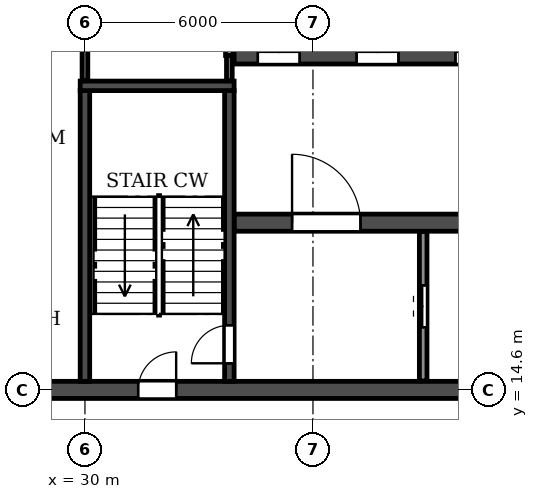
"""IFC4 building model, lengths in metres.
Left out: names, types, materials, properties, quantities, classifications, styles, units other than length and angle.
Written with IfcOpenShell. Run it as: python <this file> out.ifc"""

import sys

from ifc_helpers import new_model, si_unit, direction, frame, frame_2d, origin, place, context, subcontext, project, spatial, rectangle, extrude, element, fill, save


model = new_model("IFC4")
c1 = context("Model", 3, precision=1e-05, world=origin(), true_north=direction((0.0, 1.0)))
c2 = subcontext(c1, "Body", "Model", "MODEL_VIEW")
j1 = project(units=[si_unit("LENGTHUNIT", "METRE"), si_unit("PLANEANGLEUNIT", "RADIAN")], contexts=[c1])
p1 = place(None, origin())
s1 = spatial("IfcSite", under=j1, at=p1, CompositionType="ELEMENT")
p2 = place(p1, origin())
s2 = spatial("IfcBuilding", under=s1, at=p2, CompositionType="ELEMENT")
p3 = place(p2, frame((0.0, 0.0, 152.1)))
s3 = spatial("IfcBuildingStorey", under=s2, at=p3, CompositionType="ELEMENT", Elevation=152.1)
p4 = place(p3, frame((12.2, 14.6, 0.0), z_axis=(0.0, 0.0, 1.0), x_axis=(1.0, 0.0, 0.0)))
e1 = element("IfcWall", 1, at=p4, inside=s3, PredefinedType="SOLIDWALL", context=c2, shape_type="SweptSolid", body=[
    extrude(rectangle(XDim=77.6, YDim=0.45, at=frame_2d((38.8, 0.0))), origin(), (0.0, 0.0, 1.0), 3.07),
])
p5 = place(p4, frame((2.3, 0.0, 0.0)))
e2 = element("IfcOpeningElement", 2, at=p5, cuts=e1, PredefinedType="OPENING", context=c2, shape_type="SweptSolid", body=[
    extrude(rectangle(XDim=1.0, YDim=2.1, at=frame_2d((0.5, 1.05))), frame((0.0, 0.235, 0.0), z_axis=(0.0, -1.0, 0.0), x_axis=(1.0, 0.0, 0.0)), (0.0, 0.0, 1.0), 0.47),
])
p6 = place(p4, frame((6.7, 0.0, 0.0)))
e3 = element("IfcOpeningElement", 3, at=p6, cuts=e1, PredefinedType="OPENING", context=c2, shape_type="SweptSolid", body=[
    extrude(rectangle(XDim=1.0, YDim=2.1, at=frame_2d((0.5, 1.05))), frame((0.0, 0.235, 0.0), z_axis=(0.0, -1.0, 0.0), x_axis=(1.0, 0.0, 0.0)), (0.0, 0.0, 1.0), 0.47),
])
p7 = place(p4, frame((14.6, 0.0, 0.0)))
e4 = element("IfcOpeningElement", 4, at=p7, cuts=e1, PredefinedType="OPENING", context=c2, shape_type="SweptSolid", body=[
    extrude(rectangle(XDim=1.0, YDim=2.1, at=frame_2d((0.5, 1.05))), frame((0.0, 0.235, 0.0), z_axis=(0.0, -1.0, 0.0), x_axis=(1.0, 0.0, 0.0)), (0.0, 0.0, 1.0), 0.47),
])
p8 = place(p4, frame((19.2, 0.0, 0.0)))
e5 = element("IfcOpeningElement", 5, at=p8, cuts=e1, PredefinedType="OPENING", context=c2, shape_type="SweptSolid", body=[
    extrude(rectangle(XDim=1.0, YDim=2.1, at=frame_2d((0.5, 1.05))), frame((0.0, 0.235, 0.0), z_axis=(0.0, -1.0, 0.0), x_axis=(1.0, 0.0, 0.0)), (0.0, 0.0, 1.0), 0.47),
])
p9 = place(p4, frame((30.5, 0.0, 0.0)))
e6 = element("IfcOpeningElement", 6, at=p9, cuts=e1, PredefinedType="OPENING", context=c2, shape_type="SweptSolid", body=[
    extrude(rectangle(XDim=1.0, YDim=2.1, at=frame_2d((0.5, 1.05))), frame((0.0, 0.235, 0.0), z_axis=(0.0, -1.0, 0.0), x_axis=(1.0, 0.0, 0.0)), (0.0, 0.0, 1.0), 0.47),
])
p10 = place(p4, frame((34.15, 0.0, 0.0)))
e7 = element("IfcOpeningElement", 7, at=p10, cuts=e1, PredefinedType="OPENING", context=c2, shape_type="SweptSolid", body=[
    extrude(rectangle(XDim=1.5, YDim=2.1, at=frame_2d((0.75, 1.05))), frame((0.0, 0.235, 0.0), z_axis=(0.0, -1.0, 0.0), x_axis=(1.0, 0.0, 0.0)), (0.0, 0.0, 1.0), 0.47),
])
p11 = place(p4, frame((38.3, 0.0, 0.0)))
e8 = element("IfcOpeningElement", 8, at=p11, cuts=e1, PredefinedType="OPENING", context=c2, shape_type="SweptSolid", body=[
    extrude(rectangle(XDim=1.0, YDim=2.1, at=frame_2d((0.5, 1.05))), frame((0.0, 0.235, 0.0), z_axis=(0.0, -1.0, 0.0), x_axis=(1.0, 0.0, 0.0)), (0.0, 0.0, 1.0), 0.47),
])
p12 = place(p4, frame((43.5, 0.0, 0.0)))
e9 = element("IfcOpeningElement", 9, at=p12, cuts=e1, PredefinedType="OPENING", context=c2, shape_type="SweptSolid", body=[
    extrude(rectangle(XDim=1.0, YDim=2.1, at=frame_2d((0.5, 1.05))), frame((0.0, 0.235, 0.0), z_axis=(0.0, -1.0, 0.0), x_axis=(1.0, 0.0, 0.0)), (0.0, 0.0, 1.0), 0.47),
])
p13 = place(p4, frame((57.4, 0.0, 0.0)))
e10 = element("IfcOpeningElement", 10, at=p13, cuts=e1, PredefinedType="OPENING", context=c2, shape_type="SweptSolid", body=[
    extrude(rectangle(XDim=1.0, YDim=2.1, at=frame_2d((0.5, 1.05))), frame((0.0, 0.235, 0.0), z_axis=(0.0, -1.0, 0.0), x_axis=(1.0, 0.0, 0.0)), (0.0, 0.0, 1.0), 0.47),
])
p14 = place(p4, frame((62.0, 0.0, 0.0)))
e11 = element("IfcOpeningElement", 11, at=p14, cuts=e1, PredefinedType="OPENING", context=c2, shape_type="SweptSolid", body=[
    extrude(rectangle(XDim=1.0, YDim=2.1, at=frame_2d((0.5, 1.05))), frame((0.0, 0.235, 0.0), z_axis=(0.0, -1.0, 0.0), x_axis=(1.0, 0.0, 0.0)), (0.0, 0.0, 1.0), 0.47),
])
p15 = place(p4, frame((69.9, 0.0, 0.0)))
e12 = element("IfcOpeningElement", 12, at=p15, cuts=e1, PredefinedType="OPENING", context=c2, shape_type="SweptSolid", body=[
    extrude(rectangle(XDim=1.0, YDim=2.1, at=frame_2d((0.5, 1.05))), frame((0.0, 0.235, 0.0), z_axis=(0.0, -1.0, 0.0), x_axis=(1.0, 0.0, 0.0)), (0.0, 0.0, 1.0), 0.47),
])
p16 = place(p4, frame((74.3, 0.0, 0.0)))
e13 = element("IfcOpeningElement", 13, at=p16, cuts=e1, PredefinedType="OPENING", context=c2, shape_type="SweptSolid", body=[
    extrude(rectangle(XDim=1.0, YDim=2.1, at=frame_2d((0.5, 1.05))), frame((0.0, 0.235, 0.0), z_axis=(0.0, -1.0, 0.0), x_axis=(1.0, 0.0, 0.0)), (0.0, 0.0, 1.0), 0.47),
])
p17 = place(p3, frame((33.925, 19.0, 0.0), z_axis=(0.0, 0.0, 1.0), x_axis=(1.0, 0.0, 0.0)))
e14 = element("IfcWall", 14, at=p17, inside=s3, PredefinedType="SOLIDWALL", context=c2, shape_type="SweptSolid", body=[
    extrude(rectangle(XDim=34.15, YDim=0.45, at=frame_2d((17.075, 0.0))), origin(), (0.0, 0.0, 1.0), 3.07),
])
p18 = place(p17, frame((16.175, 0.0, 0.0)))
e15 = element("IfcOpeningElement", 15, at=p18, cuts=e14, PredefinedType="OPENING", context=c2, shape_type="SweptSolid", body=[
    extrude(rectangle(XDim=1.8, YDim=2.1, at=frame_2d((0.9, 1.05))), frame((0.0, 0.235, 0.0), z_axis=(0.0, -1.0, 0.0), x_axis=(1.0, 0.0, 0.0)), (0.0, 0.0, 1.0), 0.47),
])
p19 = place(p17, frame((1.525, 0.0, 0.0)))
e16 = element("IfcOpeningElement", 16, at=p19, cuts=e14, PredefinedType="OPENING", context=c2, shape_type="SweptSolid", body=[
    extrude(rectangle(XDim=1.8, YDim=2.1, at=frame_2d((0.9, 1.05))), frame((0.0, 0.235, 0.0), z_axis=(0.0, -1.0, 0.0), x_axis=(1.0, 0.0, 0.0)), (0.0, 0.0, 1.0), 0.47),
])
p20 = place(p17, frame((30.825, 0.0, 0.0)))
e17 = element("IfcOpeningElement", 17, at=p20, cuts=e14, PredefinedType="OPENING", context=c2, shape_type="SweptSolid", body=[
    extrude(rectangle(XDim=1.8, YDim=2.1, at=frame_2d((0.9, 1.05))), frame((0.0, 0.235, 0.0), z_axis=(0.0, -1.0, 0.0), x_axis=(1.0, 0.0, 0.0)), (0.0, 0.0, 1.0), 0.47),
])
p21 = place(p3, frame((33.925, 23.4, 0.0), z_axis=(0.0, 0.0, 1.0), x_axis=(1.0, 0.0, 0.0)))
e18 = element("IfcWall", 18, at=p21, inside=s3, PredefinedType="SOLIDWALL", context=c2, shape_type="SweptSolid", body=[
    extrude(rectangle(XDim=34.15, YDim=0.45, at=frame_2d((17.075, 0.0))), origin(), (0.0, 0.0, 1.0), 3.07),
])
p22 = place(p21, frame((16.175, 0.0, 0.0)))
e19 = element("IfcOpeningElement", 19, at=p22, cuts=e18, PredefinedType="OPENING", context=c2, shape_type="SweptSolid", body=[
    extrude(rectangle(XDim=1.8, YDim=2.1, at=frame_2d((0.9, 1.05))), frame((0.0, 0.235, 0.0), z_axis=(0.0, -1.0, 0.0), x_axis=(1.0, 0.0, 0.0)), (0.0, 0.0, 1.0), 0.47),
])
p23 = place(p21, frame((0.625, 0.0, 0.0)))
e20 = element("IfcOpeningElement", 20, at=p23, cuts=e18, PredefinedType="OPENING", context=c2, shape_type="SweptSolid", body=[
    extrude(rectangle(XDim=1.1, YDim=2.1, at=frame_2d((0.55, 1.05))), frame((0.0, 0.235, 0.0), z_axis=(0.0, -1.0, 0.0), x_axis=(1.0, 0.0, 0.0)), (0.0, 0.0, 1.0), 0.47),
])
p24 = place(p21, frame((3.225, 0.0, 0.0)))
e21 = element("IfcOpeningElement", 21, at=p24, cuts=e18, PredefinedType="OPENING", context=c2, shape_type="SweptSolid", body=[
    extrude(rectangle(XDim=1.1, YDim=2.1, at=frame_2d((0.55, 1.05))), frame((0.0, 0.235, 0.0), z_axis=(0.0, -1.0, 0.0), x_axis=(1.0, 0.0, 0.0)), (0.0, 0.0, 1.0), 0.47),
])
p25 = place(p21, frame((5.825, 0.0, 0.0)))
e22 = element("IfcOpeningElement", 22, at=p25, cuts=e18, PredefinedType="OPENING", context=c2, shape_type="SweptSolid", body=[
    extrude(rectangle(XDim=1.1, YDim=2.1, at=frame_2d((0.55, 1.05))), frame((0.0, 0.235, 0.0), z_axis=(0.0, -1.0, 0.0), x_axis=(1.0, 0.0, 0.0)), (0.0, 0.0, 1.0), 0.47),
])
p26 = place(p21, frame((8.425, 0.0, 0.0)))
e23 = element("IfcOpeningElement", 23, at=p26, cuts=e18, PredefinedType="OPENING", context=c2, shape_type="SweptSolid", body=[
    extrude(rectangle(XDim=1.1, YDim=2.1, at=frame_2d((0.55, 1.05))), frame((0.0, 0.235, 0.0), z_axis=(0.0, -1.0, 0.0), x_axis=(1.0, 0.0, 0.0)), (0.0, 0.0, 1.0), 0.47),
])
p27 = place(p21, frame((11.025, 0.0, 0.0)))
e24 = element("IfcOpeningElement", 24, at=p27, cuts=e18, PredefinedType="OPENING", context=c2, shape_type="SweptSolid", body=[
    extrude(rectangle(XDim=1.1, YDim=2.1, at=frame_2d((0.55, 1.05))), frame((0.0, 0.235, 0.0), z_axis=(0.0, -1.0, 0.0), x_axis=(1.0, 0.0, 0.0)), (0.0, 0.0, 1.0), 0.47),
])
p28 = place(p21, frame((13.625, 0.0, 0.0)))
e25 = element("IfcOpeningElement", 25, at=p28, cuts=e18, PredefinedType="OPENING", context=c2, shape_type="SweptSolid", body=[
    extrude(rectangle(XDim=1.1, YDim=2.1, at=frame_2d((0.55, 1.05))), frame((0.0, 0.235, 0.0), z_axis=(0.0, -1.0, 0.0), x_axis=(1.0, 0.0, 0.0)), (0.0, 0.0, 1.0), 0.47),
])
p29 = place(p21, frame((27.225, 0.0, 0.0)))
e26 = element("IfcOpeningElement", 26, at=p29, cuts=e18, PredefinedType="OPENING", context=c2, shape_type="SweptSolid", body=[
    extrude(rectangle(XDim=1.1, YDim=2.1, at=frame_2d((0.55, 1.05))), frame((0.0, 0.235, 0.0), z_axis=(0.0, -1.0, 0.0), x_axis=(1.0, 0.0, 0.0)), (0.0, 0.0, 1.0), 0.47),
])
p30 = place(p3, frame((30.0, 14.825, 0.0), z_axis=(0.0, 0.0, 1.0), x_axis=(0.0, 1.0, 0.0)))
e27 = element("IfcWall", 27, at=p30, inside=s3, PredefinedType="SOLIDWALL", context=c2, shape_type="SweptSolid", body=[
    extrude(rectangle(XDim=7.65, YDim=0.25, at=frame_2d((3.825, 0.0))), origin(), (0.0, 0.0, 1.0), 3.07),
])
p31 = place(p3, frame((33.8, 14.825, 0.0), z_axis=(0.0, 0.0, 1.0), x_axis=(0.0, 1.0, 0.0)))
e28 = element("IfcWall", 28, at=p31, inside=s3, PredefinedType="SOLIDWALL", context=c2, shape_type="SweptSolid", body=[
    extrude(rectangle(XDim=7.65, YDim=0.25, at=frame_2d((3.825, 0.0))), origin(), (0.0, 0.0, 1.0), 3.07),
])
p32 = place(p31, frame((0.475, 0.0, 0.0)))
e29 = element("IfcOpeningElement", 29, at=p32, cuts=e28, PredefinedType="OPENING", context=c2, shape_type="SweptSolid", body=[
    extrude(rectangle(XDim=1.0, YDim=2.1, at=frame_2d((0.5, 1.05))), frame((0.0, 0.135, 0.0), z_axis=(0.0, -1.0, 0.0), x_axis=(1.0, 0.0, 0.0)), (0.0, 0.0, 1.0), 0.27),
])
p33 = place(p3, frame((29.875, 22.6, 0.0), z_axis=(0.0, 0.0, 1.0), x_axis=(1.0, 0.0, 0.0)))
e30 = element("IfcWall", 30, at=p33, inside=s3, PredefinedType="SOLIDWALL", context=c2, shape_type="SweptSolid", body=[
    extrude(rectangle(XDim=4.05, YDim=0.25, at=frame_2d((2.025, 0.0))), origin(), (0.0, 0.0, 1.0), 3.07),
])
p34 = place(p3, frame((30.0, 22.735, 0.0), z_axis=(0.0, 0.0, 1.0), x_axis=(0.0, 1.0, 0.0)))
e31 = element("IfcWall", 31, at=p34, inside=s3, PredefinedType="PARTITIONING", context=c2, shape_type="SweptSolid", body=[
    extrude(rectangle(XDim=4.83, YDim=0.15, at=frame_2d((2.415, 0.0))), origin(), (0.0, 0.0, 1.0), 3.07),
])
p35 = place(p3, frame((33.8, 22.735, 0.0), z_axis=(0.0, 0.0, 1.0), x_axis=(0.0, 1.0, 0.0)))
e32 = element("IfcWall", 32, at=p35, inside=s3, PredefinedType="PARTITIONING", context=c2, shape_type="SweptSolid", body=[
    extrude(rectangle(XDim=0.665, YDim=0.15, at=frame_2d((0.333, 0.0))), origin(), (0.0, 0.0, 1.0), 3.07),
])
p36 = place(p3, frame((33.8, 23.4, 0.0), z_axis=(0.0, 0.0, 1.0), x_axis=(0.0, 1.0, 0.0)))
e33 = element("IfcWall", 33, at=p36, inside=s3, PredefinedType="PARTITIONING", context=c2, shape_type="SweptSolid", body=[
    extrude(rectangle(XDim=2.7, YDim=0.2, at=frame_2d((1.35, 0.0))), origin(), (0.0, 0.0, 1.0), 3.07),
])
p37 = place(p3, frame((38.9, 14.835, 0.0), z_axis=(0.0, 0.0, 1.0), x_axis=(0.0, 1.0, 0.0)))
e34 = element("IfcWall", 34, at=p37, inside=s3, PredefinedType="PARTITIONING", context=c2, shape_type="SweptSolid", body=[
    extrude(rectangle(XDim=3.93, YDim=0.2, at=frame_2d((1.965, 0.0))), origin(), (0.0, 0.0, 1.0), 3.07),
])
p38 = place(p37, frame((1.415, 0.0, 0.0)))
e35 = element("IfcOpeningElement", 35, at=p38, cuts=e34, PredefinedType="OPENING", context=c2, shape_type="SweptSolid", body=[
    extrude(rectangle(XDim=1.1, YDim=2.1, at=frame_2d((0.55, 1.05))), frame((0.0, 0.11, 0.0), z_axis=(0.0, -1.0, 0.0), x_axis=(1.0, 0.0, 0.0)), (0.0, 0.0, 1.0), 0.22),
])
p39 = place(p8, origin())
e36 = element("IfcDoor", 36, at=p39, inside=s3, OperationType="SINGLE_SWING_RIGHT", PredefinedType="DOOR", context=c2, shape_type="SweptSolid", body=[
    extrude(rectangle(XDim=1.0, YDim=2.1, at=frame_2d((0.5, 1.05))), frame((0.0, 0.025, 0.0), z_axis=(0.0, -1.0, 0.0), x_axis=(1.0, 0.0, 0.0)), (0.0, 0.0, 1.0), 0.05),
])
fill(e5, e36)
p40 = place(p32, origin())
e37 = element("IfcDoor", 37, at=p40, inside=s3, OperationType="SINGLE_SWING_LEFT", PredefinedType="DOOR", context=c2, shape_type="SweptSolid", body=[
    extrude(rectangle(XDim=1.0, YDim=2.1, at=frame_2d((0.5, 1.05))), frame((0.0, 0.025, 0.0), z_axis=(0.0, -1.0, 0.0), x_axis=(1.0, 0.0, 0.0)), (0.0, 0.0, 1.0), 0.05),
])
fill(e29, e37)
p41 = place(p38, origin())
e38 = element("IfcDoor", 38, at=p41, inside=s3, OperationType="DOUBLE_DOOR_SLIDING", PredefinedType="DOOR", context=c2, shape_type="SweptSolid", body=[
    extrude(rectangle(XDim=1.1, YDim=2.1, at=frame_2d((0.55, 1.05))), frame((0.0, 0.025, 0.0), z_axis=(0.0, -1.0, 0.0), x_axis=(1.0, 0.0, 0.0)), (0.0, 0.0, 1.0), 0.05),
])
fill(e35, e38)
p42 = place(p23, origin())
e39 = element("IfcDoor", 39, at=p42, inside=s3, OperationType="DOUBLE_DOOR_SLIDING", PredefinedType="DOOR", context=c2, shape_type="SweptSolid", body=[
    extrude(rectangle(XDim=1.1, YDim=2.1, at=frame_2d((0.55, 1.05))), frame((0.0, 0.025, 0.0), z_axis=(0.0, -1.0, 0.0), x_axis=(1.0, 0.0, 0.0)), (0.0, 0.0, 1.0), 0.05),
])
fill(e20, e39)
p43 = place(p19, origin())
e40 = element("IfcDoor", 40, at=p43, inside=s3, OperationType="DOUBLE_DOOR_SINGLE_SWING", PredefinedType="DOOR", context=c2, shape_type="SweptSolid", body=[
    extrude(rectangle(XDim=1.8, YDim=2.1, at=frame_2d((0.9, 1.05))), frame((0.0, 0.025, 0.0), z_axis=(0.0, -1.0, 0.0), x_axis=(1.0, 0.0, 0.0)), (0.0, 0.0, 1.0), 0.05),
])
fill(e16, e40)
p44 = place(p24, origin())
e41 = element("IfcDoor", 41, at=p44, inside=s3, OperationType="DOUBLE_DOOR_SLIDING", PredefinedType="DOOR", context=c2, shape_type="SweptSolid", body=[
    extrude(rectangle(XDim=1.1, YDim=2.1, at=frame_2d((0.55, 1.05))), frame((0.0, 0.025, 0.0), z_axis=(0.0, -1.0, 0.0), x_axis=(1.0, 0.0, 0.0)), (0.0, 0.0, 1.0), 0.05),
])
fill(e21, e41)
p45 = place(p25, origin())
e42 = element("IfcDoor", 42, at=p45, inside=s3, OperationType="DOUBLE_DOOR_SLIDING", PredefinedType="DOOR", context=c2, shape_type="SweptSolid", body=[
    extrude(rectangle(XDim=1.1, YDim=2.1, at=frame_2d((0.55, 1.05))), frame((0.0, 0.025, 0.0), z_axis=(0.0, -1.0, 0.0), x_axis=(1.0, 0.0, 0.0)), (0.0, 0.0, 1.0), 0.05),
])
fill(e22, e42)
save(model, sys.argv[1])
